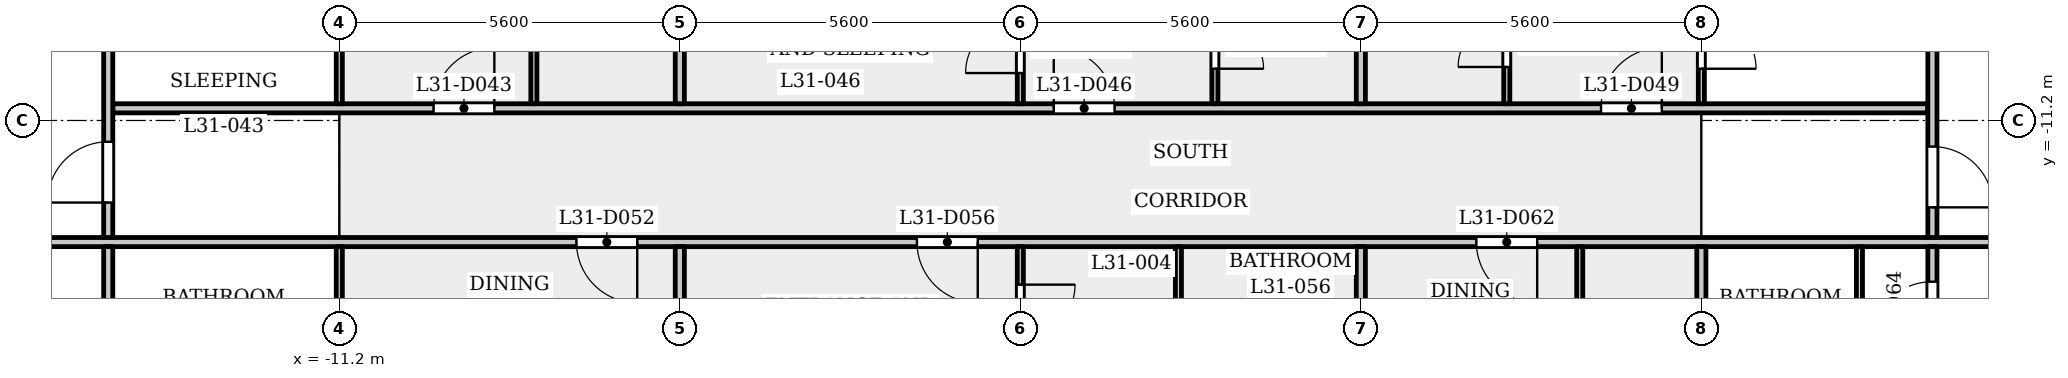
"""IFC4 building model, lengths in metres.
Left out: names, types, materials, properties, quantities, classifications, styles, units other than length and angle.
Written with IfcOpenShell. Run it as: python <this file> out.ifc"""

import sys

from ifc_helpers import new_model, si_unit, direction, frame, frame_2d, origin, place, context, subcontext, project, spatial, rectangle, extrude, element, fill, save


model = new_model("IFC4")
c1 = context("Model", 3, precision=1e-05, world=origin(), true_north=direction((0.0, 1.0)))
c2 = subcontext(c1, "Body", "Model", "MODEL_VIEW")
j1 = project(units=[si_unit("LENGTHUNIT", "METRE"), si_unit("PLANEANGLEUNIT", "RADIAN")], contexts=[c1])
p1 = place(None, origin())
s1 = spatial("IfcSite", under=j1, at=p1, CompositionType="ELEMENT")
p2 = place(p1, origin())
s2 = spatial("IfcBuilding", under=s1, at=p2, CompositionType="ELEMENT")
p3 = place(p2, frame((0.0, 0.0, 121.8)))
s3 = spatial("IfcBuildingStorey", under=s2, at=p3, CompositionType="ELEMENT", Elevation=121.8)
p4 = place(p3, frame((-17.4, -13.2, 0.0), z_axis=(0.0, 0.0, 1.0), x_axis=(1.0, 0.0, 0.0)))
e1 = element("IfcWall", 1, at=p4, inside=s3, PredefinedType="PARTITIONING", context=c2, shape_type="SweptSolid", body=[
    extrude(rectangle(XDim=34.8, YDim=0.15, at=frame_2d((17.4, 0.0))), origin(), (0.0, 0.0, 1.0), 3.15),
])
p5 = place(p4, frame((0.15, 0.0, 0.0)))
e2 = element("IfcOpeningElement", 2, at=p5, cuts=e1, PredefinedType="OPENING", context=c2, shape_type="SweptSolid", body=[
    extrude(rectangle(XDim=1.0, YDim=2.1, at=frame_2d((0.5, 1.05))), frame((0.0, 0.085, 0.0), z_axis=(0.0, -1.0, 0.0), x_axis=(1.0, 0.0, 0.0)), (0.0, 0.0, 1.0), 0.17),
])
p6 = place(p4, frame((33.55, 0.0, 0.0)))
e3 = element("IfcOpeningElement", 3, at=p6, cuts=e1, PredefinedType="OPENING", context=c2, shape_type="SweptSolid", body=[
    extrude(rectangle(XDim=1.0, YDim=2.1, at=frame_2d((0.5, 1.05))), frame((0.0, 0.085, 0.0), z_axis=(0.0, -1.0, 0.0), x_axis=(1.0, 0.0, 0.0)), (0.0, 0.0, 1.0), 0.17),
])
p7 = place(p4, frame((10.1, 0.0, 0.0)))
e4 = element("IfcOpeningElement", 4, at=p7, cuts=e1, PredefinedType="OPENING", context=c2, shape_type="SweptSolid", body=[
    extrude(rectangle(XDim=1.0, YDim=2.1, at=frame_2d((0.5, 1.05))), frame((0.0, 0.085, 0.0), z_axis=(0.0, -1.0, 0.0), x_axis=(1.0, 0.0, 0.0)), (0.0, 0.0, 1.0), 0.17),
])
p8 = place(p4, frame((15.7, 0.0, 0.0)))
e5 = element("IfcOpeningElement", 5, at=p8, cuts=e1, PredefinedType="OPENING", context=c2, shape_type="SweptSolid", body=[
    extrude(rectangle(XDim=1.0, YDim=2.1, at=frame_2d((0.5, 1.05))), frame((0.0, 0.085, 0.0), z_axis=(0.0, -1.0, 0.0), x_axis=(1.0, 0.0, 0.0)), (0.0, 0.0, 1.0), 0.17),
])
p9 = place(p4, frame((24.9, 0.0, 0.0)))
e6 = element("IfcOpeningElement", 6, at=p9, cuts=e1, PredefinedType="OPENING", context=c2, shape_type="SweptSolid", body=[
    extrude(rectangle(XDim=1.0, YDim=2.1, at=frame_2d((0.5, 1.05))), frame((0.0, 0.085, 0.0), z_axis=(0.0, -1.0, 0.0), x_axis=(1.0, 0.0, 0.0)), (0.0, 0.0, 1.0), 0.17),
])
p10 = place(p3, frame((-14.925, -11.0, 0.0), z_axis=(0.0, 0.0, 1.0), x_axis=(1.0, 0.0, 0.0)))
e7 = element("IfcWall", 7, at=p10, inside=s3, PredefinedType="PARTITIONING", context=c2, shape_type="SweptSolid", body=[
    extrude(rectangle(XDim=29.85, YDim=0.15, at=frame_2d((14.925, 0.0))), origin(), (0.0, 0.0, 1.0), 3.15),
])
p11 = place(p10, frame((5.275, 0.0, 0.0)))
e8 = element("IfcOpeningElement", 8, at=p11, cuts=e7, PredefinedType="OPENING", context=c2, shape_type="SweptSolid", body=[
    extrude(rectangle(XDim=1.0, YDim=2.1, at=frame_2d((0.5, 1.05))), frame((0.0, 0.085, 0.0), z_axis=(0.0, -1.0, 0.0), x_axis=(1.0, 0.0, 0.0)), (0.0, 0.0, 1.0), 0.17),
])
p12 = place(p10, frame((15.475, 0.0, 0.0)))
e9 = element("IfcOpeningElement", 9, at=p12, cuts=e7, PredefinedType="OPENING", context=c2, shape_type="SweptSolid", body=[
    extrude(rectangle(XDim=1.0, YDim=2.1, at=frame_2d((0.5, 1.05))), frame((0.0, 0.085, 0.0), z_axis=(0.0, -1.0, 0.0), x_axis=(1.0, 0.0, 0.0)), (0.0, 0.0, 1.0), 0.17),
])
p13 = place(p10, frame((24.475, 0.0, 0.0)))
e10 = element("IfcOpeningElement", 10, at=p13, cuts=e7, PredefinedType="OPENING", context=c2, shape_type="SweptSolid", body=[
    extrude(rectangle(XDim=1.0, YDim=2.1, at=frame_2d((0.5, 1.05))), frame((0.0, 0.085, 0.0), z_axis=(0.0, -1.0, 0.0), x_axis=(1.0, 0.0, 0.0)), (0.0, 0.0, 1.0), 0.17),
])
p14 = place(p3, frame((-15.0, -15.325, 0.0), z_axis=(0.0, 0.0, 1.0), x_axis=(0.0, 1.0, 0.0)))
e11 = element("IfcWall", 11, at=p14, inside=s3, PredefinedType="PARTITIONING", context=c2, shape_type="SweptSolid", body=[
    extrude(rectangle(XDim=2.05, YDim=0.15, at=frame_2d((1.025, 0.0))), origin(), (0.0, 0.0, 1.0), 3.15),
])
p15 = place(p3, frame((-15.0, -13.125, 0.0), z_axis=(0.0, 0.0, 1.0), x_axis=(0.0, 1.0, 0.0)))
e12 = element("IfcWall", 12, at=p15, inside=s3, PredefinedType="PARTITIONING", context=c2, shape_type="SweptSolid", body=[
    extrude(rectangle(XDim=6.356, YDim=0.15, at=frame_2d((3.178, 0.0))), origin(), (0.0, 0.0, 1.0), 3.15),
])
p16 = place(p15, frame((0.575, 0.0, 0.0)))
e13 = element("IfcOpeningElement", 13, at=p16, cuts=e12, PredefinedType="OPENING", context=c2, shape_type="SweptSolid", body=[
    extrude(rectangle(XDim=1.0, YDim=2.1, at=frame_2d((0.5, 1.05))), frame((0.0, 0.085, 0.0), z_axis=(0.0, -1.0, 0.0), x_axis=(1.0, 0.0, 0.0)), (0.0, 0.0, 1.0), 0.17),
])
p17 = place(p3, frame((-11.2, -16.15, 0.0), z_axis=(0.0, 0.0, 1.0), x_axis=(0.0, 1.0, 0.0)))
e14 = element("IfcWall", 14, at=p17, inside=s3, PredefinedType="PARTITIONING", context=c2, shape_type="SweptSolid", body=[
    extrude(rectangle(XDim=2.875, YDim=0.1, at=frame_2d((1.438, 0.0))), origin(), (0.0, 0.0, 1.0), 3.15),
])
p18 = place(p3, frame((-11.2, -10.925, 0.0), z_axis=(0.0, 0.0, 1.0), x_axis=(0.0, 1.0, 0.0)))
e15 = element("IfcWall", 15, at=p18, inside=s3, PredefinedType="PARTITIONING", context=c2, shape_type="SweptSolid", body=[
    extrude(rectangle(XDim=3.605, YDim=0.1, at=frame_2d((1.802, 0.0))), origin(), (0.0, 0.0, 1.0), 3.15),
])
p19 = place(p18, frame((1.005, 0.0, 0.0)))
e16 = element("IfcOpeningElement", 16, at=p19, cuts=e15, PredefinedType="OPENING", context=c2, shape_type="SweptSolid", body=[
    extrude(rectangle(XDim=0.9, YDim=2.1, at=frame_2d((0.45, 1.05))), frame((0.0, 0.06, 0.0), z_axis=(0.0, -1.0, 0.0), x_axis=(1.0, 0.0, 0.0)), (0.0, 0.0, 1.0), 0.12),
])
p20 = place(p3, frame((-8.0, -10.925, 0.0), z_axis=(0.0, 0.0, 1.0), x_axis=(0.0, 1.0, 0.0)))
e17 = element("IfcWall", 17, at=p20, inside=s3, PredefinedType="PARTITIONING", context=c2, shape_type="SweptSolid", body=[
    extrude(rectangle(XDim=3.605, YDim=0.1, at=frame_2d((1.802, 0.0))), origin(), (0.0, 0.0, 1.0), 3.15),
])
p21 = place(p20, frame((2.326, 0.0, 0.0)))
e18 = element("IfcOpeningElement", 18, at=p21, cuts=e17, PredefinedType="OPENING", context=c2, shape_type="SweptSolid", body=[
    extrude(rectangle(XDim=0.8, YDim=2.1, at=frame_2d((0.4, 1.05))), frame((0.0, 0.06, 0.0), z_axis=(0.0, -1.0, 0.0), x_axis=(1.0, 0.0, 0.0)), (0.0, 0.0, 1.0), 0.12),
])
p22 = place(p3, frame((-5.6, -16.15, 0.0), z_axis=(0.0, 0.0, 1.0), x_axis=(0.0, 1.0, 0.0)))
e19 = element("IfcWall", 19, at=p22, inside=s3, PredefinedType="PARTITIONING", context=c2, shape_type="SweptSolid", body=[
    extrude(rectangle(XDim=2.875, YDim=0.15, at=frame_2d((1.438, 0.0))), origin(), (0.0, 0.0, 1.0), 3.15),
])
p23 = place(p3, frame((-5.6, -10.925, 0.0), z_axis=(0.0, 0.0, 1.0), x_axis=(0.0, 1.0, 0.0)))
e20 = element("IfcWall", 20, at=p23, inside=s3, PredefinedType="PARTITIONING", context=c2, shape_type="SweptSolid", body=[
    extrude(rectangle(XDim=3.605, YDim=0.15, at=frame_2d((1.802, 0.0))), origin(), (0.0, 0.0, 1.0), 3.15),
])
p24 = place(p3, frame((0.0, -16.15, 0.0), z_axis=(0.0, 0.0, 1.0), x_axis=(0.0, 1.0, 0.0)))
e21 = element("IfcWall", 21, at=p24, inside=s3, PredefinedType="PARTITIONING", context=c2, shape_type="SweptSolid", body=[
    extrude(rectangle(XDim=2.875, YDim=0.1, at=frame_2d((1.438, 0.0))), origin(), (0.0, 0.0, 1.0), 3.15),
])
p25 = place(p24, frame((1.35, 0.0, 0.0)))
e22 = element("IfcOpeningElement", 22, at=p25, cuts=e21, PredefinedType="OPENING", context=c2, shape_type="SweptSolid", body=[
    extrude(rectangle(XDim=0.9, YDim=2.1, at=frame_2d((0.45, 1.05))), frame((0.0, 0.06, 0.0), z_axis=(0.0, -1.0, 0.0), x_axis=(1.0, 0.0, 0.0)), (0.0, 0.0, 1.0), 0.12),
])
p26 = place(p3, frame((0.0, -10.925, 0.0), z_axis=(0.0, 0.0, 1.0), x_axis=(0.0, 1.0, 0.0)))
e23 = element("IfcWall", 23, at=p26, inside=s3, PredefinedType="PARTITIONING", context=c2, shape_type="SweptSolid", body=[
    extrude(rectangle(XDim=3.605, YDim=0.1, at=frame_2d((1.802, 0.0))), origin(), (0.0, 0.0, 1.0), 3.15),
])
p27 = place(p26, frame((0.505, 0.0, 0.0)))
e24 = element("IfcOpeningElement", 24, at=p27, cuts=e23, PredefinedType="OPENING", context=c2, shape_type="SweptSolid", body=[
    extrude(rectangle(XDim=0.9, YDim=2.1, at=frame_2d((0.45, 1.05))), frame((0.0, 0.06, 0.0), z_axis=(0.0, -1.0, 0.0), x_axis=(1.0, 0.0, 0.0)), (0.0, 0.0, 1.0), 0.12),
])
p28 = place(p3, frame((2.6, -16.15, 0.0), z_axis=(0.0, 0.0, 1.0), x_axis=(0.0, 1.0, 0.0)))
e25 = element("IfcWall", 25, at=p28, inside=s3, PredefinedType="PARTITIONING", context=c2, shape_type="SweptSolid", body=[
    extrude(rectangle(XDim=2.875, YDim=0.1, at=frame_2d((1.438, 0.0))), origin(), (0.0, 0.0, 1.0), 3.15),
])
p29 = place(p3, frame((3.2, -10.925, 0.0), z_axis=(0.0, 0.0, 1.0), x_axis=(0.0, 1.0, 0.0)))
e26 = element("IfcWall", 26, at=p29, inside=s3, PredefinedType="PARTITIONING", context=c2, shape_type="SweptSolid", body=[
    extrude(rectangle(XDim=3.605, YDim=0.1, at=frame_2d((1.802, 0.0))), origin(), (0.0, 0.0, 1.0), 3.15),
])
p30 = place(p29, frame((0.576, 0.0, 0.0)))
e27 = element("IfcOpeningElement", 27, at=p30, cuts=e26, PredefinedType="OPENING", context=c2, shape_type="SweptSolid", body=[
    extrude(rectangle(XDim=0.8, YDim=2.1, at=frame_2d((0.4, 1.05))), frame((0.0, 0.06, 0.0), z_axis=(0.0, -1.0, 0.0), x_axis=(1.0, 0.0, 0.0)), (0.0, 0.0, 1.0), 0.12),
])
p31 = place(p3, frame((5.6, -16.15, 0.0), z_axis=(0.0, 0.0, 1.0), x_axis=(0.0, 1.0, 0.0)))
e28 = element("IfcWall", 28, at=p31, inside=s3, PredefinedType="PARTITIONING", context=c2, shape_type="SweptSolid", body=[
    extrude(rectangle(XDim=2.875, YDim=0.15, at=frame_2d((1.438, 0.0))), origin(), (0.0, 0.0, 1.0), 3.15),
])
p32 = place(p3, frame((5.6, -10.925, 0.0), z_axis=(0.0, 0.0, 1.0), x_axis=(0.0, 1.0, 0.0)))
e29 = element("IfcWall", 29, at=p32, inside=s3, PredefinedType="PARTITIONING", context=c2, shape_type="SweptSolid", body=[
    extrude(rectangle(XDim=3.605, YDim=0.15, at=frame_2d((1.802, 0.0))), origin(), (0.0, 0.0, 1.0), 3.15),
])
p33 = place(p3, frame((8.0, -10.925, 0.0), z_axis=(0.0, 0.0, 1.0), x_axis=(0.0, 1.0, 0.0)))
e30 = element("IfcWall", 30, at=p33, inside=s3, PredefinedType="PARTITIONING", context=c2, shape_type="SweptSolid", body=[
    extrude(rectangle(XDim=3.605, YDim=0.1, at=frame_2d((1.802, 0.0))), origin(), (0.0, 0.0, 1.0), 3.15),
])
p34 = place(p33, frame((0.605, 0.0, 0.0)))
e31 = element("IfcOpeningElement", 31, at=p34, cuts=e30, PredefinedType="OPENING", context=c2, shape_type="SweptSolid", body=[
    extrude(rectangle(XDim=0.8, YDim=2.1, at=frame_2d((0.4, 1.05))), frame((0.0, 0.06, 0.0), z_axis=(0.0, -1.0, 0.0), x_axis=(1.0, 0.0, 0.0)), (0.0, 0.0, 1.0), 0.12),
])
p35 = place(p3, frame((9.2, -16.15, 0.0), z_axis=(0.0, 0.0, 1.0), x_axis=(0.0, 1.0, 0.0)))
e32 = element("IfcWall", 32, at=p35, inside=s3, PredefinedType="PARTITIONING", context=c2, shape_type="SweptSolid", body=[
    extrude(rectangle(XDim=2.875, YDim=0.1, at=frame_2d((1.438, 0.0))), origin(), (0.0, 0.0, 1.0), 3.15),
])
p36 = place(p3, frame((11.2, -10.925, 0.0), z_axis=(0.0, 0.0, 1.0), x_axis=(0.0, 1.0, 0.0)))
e33 = element("IfcWall", 33, at=p36, inside=s3, PredefinedType="PARTITIONING", context=c2, shape_type="SweptSolid", body=[
    extrude(rectangle(XDim=3.605, YDim=0.1, at=frame_2d((1.802, 0.0))), origin(), (0.0, 0.0, 1.0), 3.15),
])
p37 = place(p36, frame((0.576, 0.0, 0.0)))
e34 = element("IfcOpeningElement", 34, at=p37, cuts=e33, PredefinedType="OPENING", context=c2, shape_type="SweptSolid", body=[
    extrude(rectangle(XDim=0.9, YDim=2.1, at=frame_2d((0.45, 1.05))), frame((0.0, 0.06, 0.0), z_axis=(0.0, -1.0, 0.0), x_axis=(1.0, 0.0, 0.0)), (0.0, 0.0, 1.0), 0.12),
])
p38 = place(p3, frame((11.2, -16.15, 0.0), z_axis=(0.0, 0.0, 1.0), x_axis=(0.0, 1.0, 0.0)))
e35 = element("IfcWall", 35, at=p38, inside=s3, PredefinedType="PARTITIONING", context=c2, shape_type="SweptSolid", body=[
    extrude(rectangle(XDim=2.875, YDim=0.15, at=frame_2d((1.438, 0.0))), origin(), (0.0, 0.0, 1.0), 3.15),
])
p39 = place(p3, frame((13.8, -16.15, 0.0), z_axis=(0.0, 0.0, 1.0), x_axis=(0.0, 1.0, 0.0)))
e36 = element("IfcWall", 36, at=p39, inside=s3, PredefinedType="PARTITIONING", context=c2, shape_type="SweptSolid", body=[
    extrude(rectangle(XDim=2.875, YDim=0.1, at=frame_2d((1.438, 0.0))), origin(), (0.0, 0.0, 1.0), 3.15),
])
p40 = place(p3, frame((15.0, -15.325, 0.0), z_axis=(0.0, 0.0, 1.0), x_axis=(0.0, 1.0, 0.0)))
e37 = element("IfcWall", 37, at=p40, inside=s3, PredefinedType="PARTITIONING", context=c2, shape_type="SweptSolid", body=[
    extrude(rectangle(XDim=2.05, YDim=0.15, at=frame_2d((1.025, 0.0))), origin(), (0.0, 0.0, 1.0), 3.15),
])
p41 = place(p40, frame((0.474, 0.0, 0.0)))
e38 = element("IfcOpeningElement", 38, at=p41, cuts=e37, PredefinedType="OPENING", context=c2, shape_type="SweptSolid", body=[
    extrude(rectangle(XDim=1.0, YDim=2.1, at=frame_2d((0.5, 1.05))), frame((0.0, 0.085, 0.0), z_axis=(0.0, -1.0, 0.0), x_axis=(1.0, 0.0, 0.0)), (0.0, 0.0, 1.0), 0.17),
])
p42 = place(p3, frame((15.0, -13.125, 0.0), z_axis=(0.0, 0.0, 1.0), x_axis=(0.0, 1.0, 0.0)))
e39 = element("IfcWall", 39, at=p42, inside=s3, PredefinedType="PARTITIONING", context=c2, shape_type="SweptSolid", body=[
    extrude(rectangle(XDim=6.356, YDim=0.15, at=frame_2d((3.178, 0.0))), origin(), (0.0, 0.0, 1.0), 3.15),
])
p43 = place(p42, frame((0.496, 0.0, 0.0)))
e40 = element("IfcOpeningElement", 40, at=p43, cuts=e39, PredefinedType="OPENING", context=c2, shape_type="SweptSolid", body=[
    extrude(rectangle(XDim=1.0, YDim=2.1, at=frame_2d((0.5, 1.05))), frame((0.0, 0.085, 0.0), z_axis=(0.0, -1.0, 0.0), x_axis=(1.0, 0.0, 0.0)), (0.0, 0.0, 1.0), 0.17),
])
p44 = place(p16, origin())
e41 = element("IfcDoor", 41, at=p44, inside=s3, OperationType="SINGLE_SWING_RIGHT", PredefinedType="DOOR", context=c2, shape_type="SweptSolid", body=[
    extrude(rectangle(XDim=1.0, YDim=2.1, at=frame_2d((0.5, 1.05))), frame((0.0, 0.025, 0.0), z_axis=(0.0, -1.0, 0.0), x_axis=(1.0, 0.0, 0.0)), (0.0, 0.0, 1.0), 0.05),
])
fill(e13, e41)
p45 = place(p43, origin())
e42 = element("IfcDoor", 42, at=p45, inside=s3, OperationType="SINGLE_SWING_LEFT", PredefinedType="DOOR", context=c2, shape_type="SweptSolid", body=[
    extrude(rectangle(XDim=1.0, YDim=2.1, at=frame_2d((0.5, 1.05))), frame((0.0, 0.025, 0.0), z_axis=(0.0, -1.0, 0.0), x_axis=(1.0, 0.0, 0.0)), (0.0, 0.0, 1.0), 0.05),
])
fill(e40, e42)
p46 = place(p11, origin())
e43 = element("IfcDoor", 43, at=p46, inside=s3, OperationType="SINGLE_SWING_LEFT", PredefinedType="DOOR", context=c2, shape_type="SweptSolid", body=[
    extrude(rectangle(XDim=1.0, YDim=2.1, at=frame_2d((0.5, 1.05))), frame((0.0, 0.025, 0.0), z_axis=(0.0, -1.0, 0.0), x_axis=(1.0, 0.0, 0.0)), (0.0, 0.0, 1.0), 0.05),
])
fill(e8, e43)
p47 = place(p12, origin())
e44 = element("IfcDoor", 44, at=p47, inside=s3, OperationType="SINGLE_SWING_RIGHT", PredefinedType="DOOR", context=c2, shape_type="SweptSolid", body=[
    extrude(rectangle(XDim=1.0, YDim=2.1, at=frame_2d((0.5, 1.05))), frame((0.0, 0.025, 0.0), z_axis=(0.0, -1.0, 0.0), x_axis=(1.0, 0.0, 0.0)), (0.0, 0.0, 1.0), 0.05),
])
fill(e9, e44)
p48 = place(p30, origin())
e45 = element("IfcDoor", 45, at=p48, inside=s3, OperationType="SINGLE_SWING_LEFT", PredefinedType="DOOR", context=c2, shape_type="SweptSolid", body=[
    extrude(rectangle(XDim=0.8, YDim=2.1, at=frame_2d((0.4, 1.05))), frame((0.0, 0.025, 0.0), z_axis=(0.0, -1.0, 0.0), x_axis=(1.0, 0.0, 0.0)), (0.0, 0.0, 1.0), 0.05),
])
fill(e27, e45)
p49 = place(p27, origin())
e46 = element("IfcDoor", 46, at=p49, inside=s3, OperationType="SINGLE_SWING_RIGHT", PredefinedType="DOOR", context=c2, shape_type="SweptSolid", body=[
    extrude(rectangle(XDim=0.9, YDim=2.1, at=frame_2d((0.45, 1.05))), frame((0.0, 0.025, 0.0), z_axis=(0.0, -1.0, 0.0), x_axis=(1.0, 0.0, 0.0)), (0.0, 0.0, 1.0), 0.05),
])
fill(e24, e46)
p50 = place(p13, origin())
e47 = element("IfcDoor", 47, at=p50, inside=s3, OperationType="SINGLE_SWING_LEFT", PredefinedType="DOOR", context=c2, shape_type="SweptSolid", body=[
    extrude(rectangle(XDim=1.0, YDim=2.1, at=frame_2d((0.5, 1.05))), frame((0.0, 0.025, 0.0), z_axis=(0.0, -1.0, 0.0), x_axis=(1.0, 0.0, 0.0)), (0.0, 0.0, 1.0), 0.05),
])
fill(e10, e47)
p51 = place(p34, origin())
e48 = element("IfcDoor", 48, at=p51, inside=s3, OperationType="SINGLE_SWING_RIGHT", PredefinedType="DOOR", context=c2, shape_type="SweptSolid", body=[
    extrude(rectangle(XDim=0.8, YDim=2.1, at=frame_2d((0.4, 1.05))), frame((0.0, 0.025, 0.0), z_axis=(0.0, -1.0, 0.0), x_axis=(1.0, 0.0, 0.0)), (0.0, 0.0, 1.0), 0.05),
])
fill(e31, e48)
p52 = place(p37, origin())
e49 = element("IfcDoor", 49, at=p52, inside=s3, OperationType="SINGLE_SWING_LEFT", PredefinedType="DOOR", context=c2, shape_type="SweptSolid", body=[
    extrude(rectangle(XDim=0.9, YDim=2.1, at=frame_2d((0.45, 1.05))), frame((0.0, 0.025, 0.0), z_axis=(0.0, -1.0, 0.0), x_axis=(1.0, 0.0, 0.0)), (0.0, 0.0, 1.0), 0.05),
])
fill(e34, e49)
p53 = place(p7, origin())
e50 = element("IfcDoor", 50, at=p53, inside=s3, OperationType="SINGLE_SWING_RIGHT", PredefinedType="DOOR", context=c2, shape_type="SweptSolid", body=[
    extrude(rectangle(XDim=1.0, YDim=2.1, at=frame_2d((0.5, 1.05))), frame((0.0, 0.025, 0.0), z_axis=(0.0, -1.0, 0.0), x_axis=(1.0, 0.0, 0.0)), (0.0, 0.0, 1.0), 0.05),
])
fill(e4, e50)
p54 = place(p8, origin())
e51 = element("IfcDoor", 51, at=p54, inside=s3, OperationType="SINGLE_SWING_RIGHT", PredefinedType="DOOR", context=c2, shape_type="SweptSolid", body=[
    extrude(rectangle(XDim=1.0, YDim=2.1, at=frame_2d((0.5, 1.05))), frame((0.0, 0.025, 0.0), z_axis=(0.0, -1.0, 0.0), x_axis=(1.0, 0.0, 0.0)), (0.0, 0.0, 1.0), 0.05),
])
fill(e5, e51)
p55 = place(p25, origin())
e52 = element("IfcDoor", 52, at=p55, inside=s3, OperationType="SINGLE_SWING_RIGHT", PredefinedType="DOOR", context=c2, shape_type="SweptSolid", body=[
    extrude(rectangle(XDim=0.9, YDim=2.1, at=frame_2d((0.45, 1.05))), frame((0.0, 0.025, 0.0), z_axis=(0.0, -1.0, 0.0), x_axis=(1.0, 0.0, 0.0)), (0.0, 0.0, 1.0), 0.05),
])
fill(e22, e52)
p56 = place(p9, origin())
e53 = element("IfcDoor", 53, at=p56, inside=s3, OperationType="SINGLE_SWING_RIGHT", PredefinedType="DOOR", context=c2, shape_type="SweptSolid", body=[
    extrude(rectangle(XDim=1.0, YDim=2.1, at=frame_2d((0.5, 1.05))), frame((0.0, 0.025, 0.0), z_axis=(0.0, -1.0, 0.0), x_axis=(1.0, 0.0, 0.0)), (0.0, 0.0, 1.0), 0.05),
])
fill(e6, e53)
p57 = place(p41, origin())
e54 = element("IfcDoor", 54, at=p57, inside=s3, OperationType="SINGLE_SWING_RIGHT", PredefinedType="DOOR", context=c2, shape_type="SweptSolid", body=[
    extrude(rectangle(XDim=1.0, YDim=2.1, at=frame_2d((0.5, 1.05))), frame((0.0, 0.025, 0.0), z_axis=(0.0, -1.0, 0.0), x_axis=(1.0, 0.0, 0.0)), (0.0, 0.0, 1.0), 0.05),
])
fill(e38, e54)
save(model, sys.argv[1])
